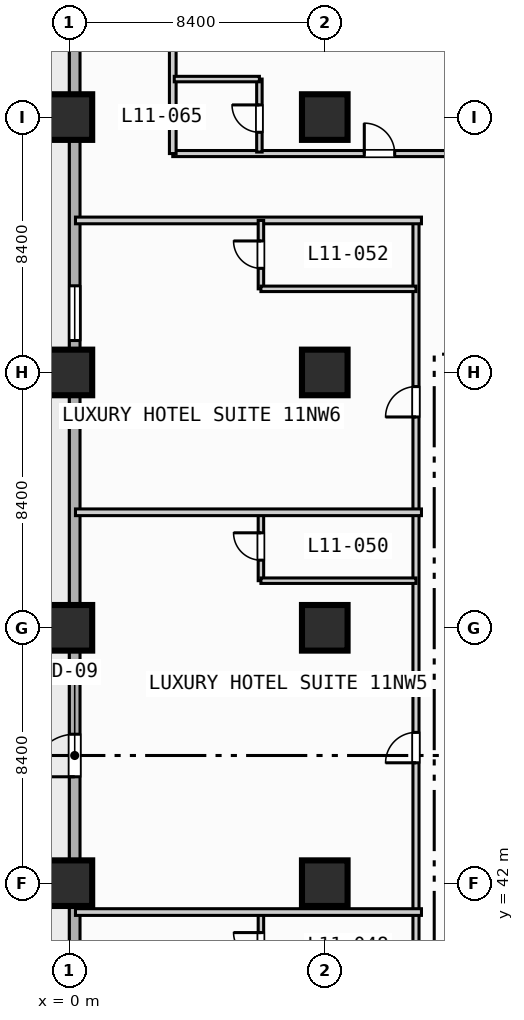
"""IFC4 building model, lengths in metres.
Left out: names, types, materials, properties, quantities, classifications, styles, units other than length and angle.
Written with IfcOpenShell. Run it as: python <this file> out.ifc"""

import sys

from ifc_helpers import new_model, si_unit, direction, frame, frame_2d, origin, origin_2d, place, context, subcontext, project, spatial, rectangle, extrude, element, fill, save


model = new_model("IFC4")
c1 = context("Model", 3, precision=1e-05, world=origin(), true_north=direction((0.0, 1.0)))
c2 = subcontext(c1, "Body", "Model", "MODEL_VIEW")
j1 = project(units=[si_unit("LENGTHUNIT", "METRE"), si_unit("PLANEANGLEUNIT", "RADIAN")], contexts=[c1])
p1 = place(None, origin())
s1 = spatial("IfcSite", under=j1, at=p1, CompositionType="ELEMENT")
p2 = place(p1, origin())
s2 = spatial("IfcBuilding", under=s1, at=p2, CompositionType="ELEMENT")
p3 = place(p2, frame((0.0, 0.0, 51.0)))
s3 = spatial("IfcBuildingStorey", under=s2, at=p3, CompositionType="ELEMENT", Elevation=51.0)
for number, where, z_axis, x_axis in (
    (1, (0.0, 42.0, 0.0), (0.0, 0.0, 1.0), (1.0, 0.0, 0.0)),
    (2, (0.0, 50.4, 0.0), (0.0, 0.0, 1.0), (1.0, 0.0, 0.0)),
    (3, (0.0, 58.8, 0.0), (0.0, 0.0, 1.0), (1.0, 0.0, 0.0)),
    (4, (0.0, 67.2, 0.0), (0.0, 0.0, 1.0), (1.0, 0.0, 0.0)),
    (5, (8.4, 42.0, 0.0), (0.0, 0.0, 1.0), (1.0, 0.0, 0.0)),
    (6, (8.4, 50.4, 0.0), (0.0, 0.0, 1.0), (1.0, 0.0, 0.0)),
    (7, (8.4, 58.8, 0.0), (0.0, 0.0, 1.0), (1.0, 0.0, 0.0)),
    (8, (8.4, 67.2, 0.0), (0.0, 0.0, 1.0), (1.0, 0.0, 0.0)),
):
    element("IfcColumn", number, at=place(p3, frame(where, z_axis=z_axis, x_axis=x_axis)), inside=s3, PredefinedType="COLUMN", context=c2, shape_type="SweptSolid", body=[
        extrude(rectangle(XDim=1.5, YDim=1.5, at=origin_2d()), origin(), (0.0, 0.0, 1.0), 3.8),
    ])
p4 = place(p3, frame((0.175, 3.175, 0.0), z_axis=(0.0, 0.0, 1.0), x_axis=(0.0, 1.0, 0.0)))
e9 = element("IfcWall", 9, at=p4, inside=s3, PredefinedType="STANDARD", context=c2, shape_type="SweptSolid", body=[
    extrude(rectangle(XDim=86.05, YDim=0.35, at=frame_2d((43.025, 0.0))), origin(), (0.0, 0.0, 1.0), 3.55),
])
p5 = place(p4, frame((42.325, 0.0, 0.0)))
e10 = element("IfcOpeningElement", 10, at=p5, cuts=e9, PredefinedType="OPENING", context=c2, shape_type="SweptSolid", body=[
    extrude(rectangle(XDim=1.4, YDim=2.2, at=frame_2d((0.7, 1.1))), frame((0.0, 0.185, 0.0), z_axis=(0.0, -1.0, 0.0), x_axis=(1.0, 0.0, 0.0)), (0.0, 0.0, 1.0), 0.37),
])
p6 = place(p4, frame((8.325, 0.0, 0.85)))
e11 = element("IfcOpeningElement", 11, at=p6, cuts=e9, PredefinedType="OPENING", context=c2, shape_type="SweptSolid", body=[
    extrude(rectangle(XDim=2.2, YDim=1.8, at=frame_2d((1.1, 0.9))), frame((0.0, 0.185, 0.0), z_axis=(0.0, -1.0, 0.0), x_axis=(1.0, 0.0, 0.0)), (0.0, 0.0, 1.0), 0.37),
])
p7 = place(p4, frame((16.725, 0.0, 0.85)))
e12 = element("IfcOpeningElement", 12, at=p7, cuts=e9, PredefinedType="OPENING", context=c2, shape_type="SweptSolid", body=[
    extrude(rectangle(XDim=2.2, YDim=1.8, at=frame_2d((1.1, 0.9))), frame((0.0, 0.185, 0.0), z_axis=(0.0, -1.0, 0.0), x_axis=(1.0, 0.0, 0.0)), (0.0, 0.0, 1.0), 0.37),
])
p8 = place(p4, frame((25.125, 0.0, 0.85)))
e13 = element("IfcOpeningElement", 13, at=p8, cuts=e9, PredefinedType="OPENING", context=c2, shape_type="SweptSolid", body=[
    extrude(rectangle(XDim=2.2, YDim=1.8, at=frame_2d((1.1, 0.9))), frame((0.0, 0.185, 0.0), z_axis=(0.0, -1.0, 0.0), x_axis=(1.0, 0.0, 0.0)), (0.0, 0.0, 1.0), 0.37),
])
p9 = place(p4, frame((33.525, 0.0, 0.85)))
e14 = element("IfcOpeningElement", 14, at=p9, cuts=e9, PredefinedType="OPENING", context=c2, shape_type="SweptSolid", body=[
    extrude(rectangle(XDim=2.2, YDim=1.8, at=frame_2d((1.1, 0.9))), frame((0.0, 0.185, 0.0), z_axis=(0.0, -1.0, 0.0), x_axis=(1.0, 0.0, 0.0)), (0.0, 0.0, 1.0), 0.37),
])
p10 = place(p4, frame((56.675, 0.0, 0.85)))
e15 = element("IfcOpeningElement", 15, at=p10, cuts=e9, PredefinedType="OPENING", context=c2, shape_type="SweptSolid", body=[
    extrude(rectangle(XDim=1.8, YDim=1.8, at=frame_2d((0.9, 0.9))), frame((0.0, 0.185, 0.0), z_axis=(0.0, -1.0, 0.0), x_axis=(1.0, 0.0, 0.0)), (0.0, 0.0, 1.0), 0.37),
])
p11 = place(p3, frame((11.4, 3.4, 0.0), z_axis=(0.0, 0.0, 1.0), x_axis=(0.0, 1.0, 0.0)))
e16 = element("IfcWall", 16, at=p11, inside=s3, PredefinedType="PARTITIONING", context=c2, shape_type="SweptSolid", body=[
    extrude(rectangle(XDim=60.4, YDim=0.2, at=frame_2d((30.2, 0.0))), origin(), (0.0, 0.0, 1.0), 3.55),
])
p12 = place(p11, frame((6.065, 0.0, 0.0)))
e17 = element("IfcOpeningElement", 17, at=p12, cuts=e16, PredefinedType="OPENING", context=c2, shape_type="SweptSolid", body=[
    extrude(rectangle(XDim=1.0, YDim=2.15, at=frame_2d((0.5, 1.075))), frame((0.0, 0.11, 0.0), z_axis=(0.0, -1.0, 0.0), x_axis=(1.0, 0.0, 0.0)), (0.0, 0.0, 1.0), 0.22),
])
p13 = place(p11, frame((13.735, 0.0, 0.0)))
e18 = element("IfcOpeningElement", 18, at=p13, cuts=e16, PredefinedType="OPENING", context=c2, shape_type="SweptSolid", body=[
    extrude(rectangle(XDim=1.0, YDim=2.15, at=frame_2d((0.5, 1.075))), frame((0.0, 0.11, 0.0), z_axis=(0.0, -1.0, 0.0), x_axis=(1.0, 0.0, 0.0)), (0.0, 0.0, 1.0), 0.22),
])
p14 = place(p11, frame((22.96, 0.0, 0.0)))
e19 = element("IfcOpeningElement", 19, at=p14, cuts=e16, PredefinedType="OPENING", context=c2, shape_type="SweptSolid", body=[
    extrude(rectangle(XDim=1.0, YDim=2.15, at=frame_2d((0.5, 1.075))), frame((0.0, 0.11, 0.0), z_axis=(0.0, -1.0, 0.0), x_axis=(1.0, 0.0, 0.0)), (0.0, 0.0, 1.0), 0.22),
])
p15 = place(p11, frame((31.785, 0.0, 0.0)))
e20 = element("IfcOpeningElement", 20, at=p15, cuts=e16, PredefinedType="OPENING", context=c2, shape_type="SweptSolid", body=[
    extrude(rectangle(XDim=1.0, YDim=2.15, at=frame_2d((0.5, 1.075))), frame((0.0, 0.11, 0.0), z_axis=(0.0, -1.0, 0.0), x_axis=(1.0, 0.0, 0.0)), (0.0, 0.0, 1.0), 0.22),
])
p16 = place(p11, frame((42.56, 0.0, 0.0)))
e21 = element("IfcOpeningElement", 21, at=p16, cuts=e16, PredefinedType="OPENING", context=c2, shape_type="SweptSolid", body=[
    extrude(rectangle(XDim=1.0, YDim=2.15, at=frame_2d((0.5, 1.075))), frame((0.0, 0.11, 0.0), z_axis=(0.0, -1.0, 0.0), x_axis=(1.0, 0.0, 0.0)), (0.0, 0.0, 1.0), 0.22),
])
p17 = place(p11, frame((53.935, 0.0, 0.0)))
e22 = element("IfcOpeningElement", 22, at=p17, cuts=e16, PredefinedType="OPENING", context=c2, shape_type="SweptSolid", body=[
    extrude(rectangle(XDim=1.0, YDim=2.15, at=frame_2d((0.5, 1.075))), frame((0.0, 0.11, 0.0), z_axis=(0.0, -1.0, 0.0), x_axis=(1.0, 0.0, 0.0)), (0.0, 0.0, 1.0), 0.22),
])
p18 = place(p3, frame((6.3, 38.8, 0.0), z_axis=(0.0, 0.0, 1.0), x_axis=(0.0, 1.0, 0.0)))
e23 = element("IfcWall", 23, at=p18, inside=s3, PredefinedType="PLUMBINGWALL", context=c2, shape_type="SweptSolid", body=[
    extrude(rectangle(XDim=2.25, YDim=0.18, at=frame_2d((1.125, 0.0))), origin(), (0.0, 0.0, 1.0), 3.55),
])
p19 = place(p18, frame((0.675, 0.0, 0.0)))
e24 = element("IfcOpeningElement", 24, at=p19, cuts=e23, PredefinedType="OPENING", context=c2, shape_type="SweptSolid", body=[
    extrude(rectangle(XDim=0.9, YDim=2.1, at=frame_2d((0.45, 1.05))), frame((0.0, 0.1, 0.0), z_axis=(0.0, -1.0, 0.0), x_axis=(1.0, 0.0, 0.0)), (0.0, 0.0, 1.0), 0.2),
])
p20 = place(p3, frame((0.2, 41.05, 0.0), z_axis=(0.0, 0.0, 1.0), x_axis=(1.0, 0.0, 0.0)))
e25 = element("IfcWall", 25, at=p20, inside=s3, PredefinedType="PARTITIONING", context=c2, shape_type="SweptSolid", body=[
    extrude(rectangle(XDim=11.38, YDim=0.22, at=frame_2d((5.69, 0.0))), origin(), (0.0, 0.0, 1.0), 3.55),
])
p21 = place(p3, frame((6.3, 51.95, 0.0), z_axis=(0.0, 0.0, 1.0), x_axis=(0.0, 1.0, 0.0)))
e26 = element("IfcWall", 26, at=p21, inside=s3, PredefinedType="PLUMBINGWALL", context=c2, shape_type="SweptSolid", body=[
    extrude(rectangle(XDim=2.25, YDim=0.18, at=frame_2d((1.125, 0.0))), origin(), (0.0, 0.0, 1.0), 3.55),
])
p22 = place(p21, frame((0.675, 0.0, 0.0)))
e27 = element("IfcOpeningElement", 27, at=p22, cuts=e26, PredefinedType="OPENING", context=c2, shape_type="SweptSolid", body=[
    extrude(rectangle(XDim=0.9, YDim=2.1, at=frame_2d((0.45, 1.05))), frame((0.0, 0.1, 0.0), z_axis=(0.0, -1.0, 0.0), x_axis=(1.0, 0.0, 0.0)), (0.0, 0.0, 1.0), 0.2),
])
p23 = place(p3, frame((6.3, 51.95, 0.0), z_axis=(0.0, 0.0, 1.0), x_axis=(1.0, 0.0, 0.0)))
e28 = element("IfcWall", 28, at=p23, inside=s3, PredefinedType="PLUMBINGWALL", context=c2, shape_type="SweptSolid", body=[
    extrude(rectangle(XDim=5.1, YDim=0.18, at=frame_2d((2.55, 0.0))), origin(), (0.0, 0.0, 1.0), 3.55),
])
for number, where, z_axis, x_axis in (
    (29, (0.2, 54.2, 0.0), (0.0, 0.0, 1.0), (1.0, 0.0, 0.0)),
    (30, (0.2, 63.8, 0.0), (0.0, 0.0, 1.0), (1.0, 0.0, 0.0)),
):
    element("IfcWall", number, at=place(p3, frame(where, z_axis=z_axis, x_axis=x_axis)), inside=s3, PredefinedType="PARTITIONING", context=c2, shape_type="SweptSolid", body=[
        extrude(rectangle(XDim=11.38, YDim=0.22, at=frame_2d((5.69, 0.0))), origin(), (0.0, 0.0, 1.0), 3.55),
    ])
p24 = place(p3, frame((6.3, 61.55, 0.0), z_axis=(0.0, 0.0, 1.0), x_axis=(0.0, 1.0, 0.0)))
e31 = element("IfcWall", 31, at=p24, inside=s3, PredefinedType="PLUMBINGWALL", context=c2, shape_type="SweptSolid", body=[
    extrude(rectangle(XDim=2.25, YDim=0.18, at=frame_2d((1.125, 0.0))), origin(), (0.0, 0.0, 1.0), 3.55),
])
p25 = place(p24, frame((0.675, 0.0, 0.0)))
e32 = element("IfcOpeningElement", 32, at=p25, cuts=e31, PredefinedType="OPENING", context=c2, shape_type="SweptSolid", body=[
    extrude(rectangle(XDim=0.9, YDim=2.1, at=frame_2d((0.45, 1.05))), frame((0.0, 0.1, 0.0), z_axis=(0.0, -1.0, 0.0), x_axis=(1.0, 0.0, 0.0)), (0.0, 0.0, 1.0), 0.2),
])
p26 = place(p3, frame((6.3, 61.55, 0.0), z_axis=(0.0, 0.0, 1.0), x_axis=(1.0, 0.0, 0.0)))
e33 = element("IfcWall", 33, at=p26, inside=s3, PredefinedType="PLUMBINGWALL", context=c2, shape_type="SweptSolid", body=[
    extrude(rectangle(XDim=5.1, YDim=0.18, at=frame_2d((2.55, 0.0))), origin(), (0.0, 0.0, 1.0), 3.55),
])
p27 = place(p3, frame((3.4, 66.0, 0.0), z_axis=(0.0, 0.0, 1.0), x_axis=(1.0, 0.0, 0.0)))
e34 = element("IfcWall", 34, at=p27, inside=s3, PredefinedType="PARTITIONING", context=c2, shape_type="SweptSolid", body=[
    extrude(rectangle(XDim=18.2, YDim=0.2, at=frame_2d((9.1, 0.0))), origin(), (0.0, 0.0, 1.0), 3.55),
])
p28 = place(p27, frame((6.3, 0.0, 0.0)))
e35 = element("IfcOpeningElement", 35, at=p28, cuts=e34, PredefinedType="OPENING", context=c2, shape_type="SweptSolid", body=[
    extrude(rectangle(XDim=1.0, YDim=2.15, at=frame_2d((0.5, 1.075))), frame((0.0, 0.11, 0.0), z_axis=(0.0, -1.0, 0.0), x_axis=(1.0, 0.0, 0.0)), (0.0, 0.0, 1.0), 0.22),
])
p29 = place(p3, frame((3.4, 66.0, 0.0), z_axis=(0.0, 0.0, 1.0), x_axis=(0.0, 1.0, 0.0)))
e36 = element("IfcWall", 36, at=p29, inside=s3, PredefinedType="PARTITIONING", context=c2, shape_type="SweptSolid", body=[
    extrude(rectangle(XDim=23.0, YDim=0.22, at=frame_2d((11.5, 0.0))), origin(), (0.0, 0.0, 1.0), 3.55),
])
p30 = place(p3, frame((6.25, 66.05, 0.0), z_axis=(0.0, 0.0, 1.0), x_axis=(0.0, 1.0, 0.0)))
e37 = element("IfcWall", 37, at=p30, inside=s3, PredefinedType="PLUMBINGWALL", context=c2, shape_type="SweptSolid", body=[
    extrude(rectangle(XDim=2.4, YDim=0.18, at=frame_2d((1.2, 0.0))), origin(), (0.0, 0.0, 1.0), 3.55),
])
p31 = place(p30, frame((0.65, 0.0, 0.0)))
e38 = element("IfcOpeningElement", 38, at=p31, cuts=e37, PredefinedType="OPENING", context=c2, shape_type="SweptSolid", body=[
    extrude(rectangle(XDim=0.9, YDim=2.1, at=frame_2d((0.45, 1.05))), frame((0.0, 0.1, 0.0), z_axis=(0.0, -1.0, 0.0), x_axis=(1.0, 0.0, 0.0)), (0.0, 0.0, 1.0), 0.2),
])
p32 = place(p3, frame((3.45, 68.45, 0.0), z_axis=(0.0, 0.0, 1.0), x_axis=(1.0, 0.0, 0.0)))
e39 = element("IfcWall", 39, at=p32, inside=s3, PredefinedType="PLUMBINGWALL", context=c2, shape_type="SweptSolid", body=[
    extrude(rectangle(XDim=2.8, YDim=0.18, at=frame_2d((1.4, 0.0))), origin(), (0.0, 0.0, 1.0), 3.55),
])
p33 = place(p5, origin())
e40 = element("IfcDoor", 40, at=p33, inside=s3, OperationType="SINGLE_SWING_LEFT", PredefinedType="DOOR", context=c2, shape_type="SweptSolid", body=[
    extrude(rectangle(XDim=1.4, YDim=2.2, at=frame_2d((0.7, 1.1))), frame((0.0, 0.025, 0.0), z_axis=(0.0, -1.0, 0.0), x_axis=(1.0, 0.0, 0.0)), (0.0, 0.0, 1.0), 0.05),
])
fill(e10, e40)
p34 = place(p10, origin())
e41 = element("IfcWindow", 41, at=p34, inside=s3, PartitioningType="SINGLE_PANEL", PredefinedType="WINDOW", context=c2, shape_type="SweptSolid", body=[
    extrude(rectangle(XDim=1.8, YDim=1.8, at=frame_2d((0.9, 0.9))), frame((0.0, 0.03, 0.0), z_axis=(0.0, -1.0, 0.0), x_axis=(1.0, 0.0, 0.0)), (0.0, 0.0, 1.0), 0.06),
])
fill(e15, e41)
p35 = place(p16, origin())
e42 = element("IfcDoor", 42, at=p35, inside=s3, OperationType="SINGLE_SWING_LEFT", PredefinedType="DOOR", context=c2, shape_type="SweptSolid", body=[
    extrude(rectangle(XDim=1.0, YDim=2.15, at=frame_2d((0.5, 1.075))), frame((0.0, 0.025, 0.0), z_axis=(0.0, -1.0, 0.0), x_axis=(1.0, 0.0, 0.0)), (0.0, 0.0, 1.0), 0.05),
])
fill(e21, e42)
p36 = place(p17, origin())
e43 = element("IfcDoor", 43, at=p36, inside=s3, OperationType="SINGLE_SWING_LEFT", PredefinedType="DOOR", context=c2, shape_type="SweptSolid", body=[
    extrude(rectangle(XDim=1.0, YDim=2.15, at=frame_2d((0.5, 1.075))), frame((0.0, 0.025, 0.0), z_axis=(0.0, -1.0, 0.0), x_axis=(1.0, 0.0, 0.0)), (0.0, 0.0, 1.0), 0.05),
])
fill(e22, e43)
p37 = place(p19, origin())
e44 = element("IfcDoor", 44, at=p37, inside=s3, OperationType="SINGLE_SWING_RIGHT", PredefinedType="DOOR", context=c2, shape_type="SweptSolid", body=[
    extrude(rectangle(XDim=0.9, YDim=2.1, at=frame_2d((0.45, 1.05))), frame((0.0, 0.025, 0.0), z_axis=(0.0, -1.0, 0.0), x_axis=(1.0, 0.0, 0.0)), (0.0, 0.0, 1.0), 0.05),
])
fill(e24, e44)
p38 = place(p22, origin())
e45 = element("IfcDoor", 45, at=p38, inside=s3, OperationType="SINGLE_SWING_RIGHT", PredefinedType="DOOR", context=c2, shape_type="SweptSolid", body=[
    extrude(rectangle(XDim=0.9, YDim=2.1, at=frame_2d((0.45, 1.05))), frame((0.0, 0.025, 0.0), z_axis=(0.0, -1.0, 0.0), x_axis=(1.0, 0.0, 0.0)), (0.0, 0.0, 1.0), 0.05),
])
fill(e27, e45)
p39 = place(p25, origin())
e46 = element("IfcDoor", 46, at=p39, inside=s3, OperationType="SINGLE_SWING_RIGHT", PredefinedType="DOOR", context=c2, shape_type="SweptSolid", body=[
    extrude(rectangle(XDim=0.9, YDim=2.1, at=frame_2d((0.45, 1.05))), frame((0.0, 0.025, 0.0), z_axis=(0.0, -1.0, 0.0), x_axis=(1.0, 0.0, 0.0)), (0.0, 0.0, 1.0), 0.05),
])
fill(e32, e46)
p40 = place(p28, origin())
e47 = element("IfcDoor", 47, at=p40, inside=s3, OperationType="SINGLE_SWING_LEFT", PredefinedType="DOOR", context=c2, shape_type="SweptSolid", body=[
    extrude(rectangle(XDim=1.0, YDim=2.15, at=frame_2d((0.5, 1.075))), frame((0.0, 0.025, 0.0), z_axis=(0.0, -1.0, 0.0), x_axis=(1.0, 0.0, 0.0)), (0.0, 0.0, 1.0), 0.05),
])
fill(e35, e47)
p41 = place(p31, origin())
e48 = element("IfcDoor", 48, at=p41, inside=s3, OperationType="SINGLE_SWING_RIGHT", PredefinedType="DOOR", context=c2, shape_type="SweptSolid", body=[
    extrude(rectangle(XDim=0.9, YDim=2.1, at=frame_2d((0.45, 1.05))), frame((0.0, 0.025, 0.0), z_axis=(0.0, -1.0, 0.0), x_axis=(1.0, 0.0, 0.0)), (0.0, 0.0, 1.0), 0.05),
])
fill(e38, e48)
save(model, sys.argv[1])
